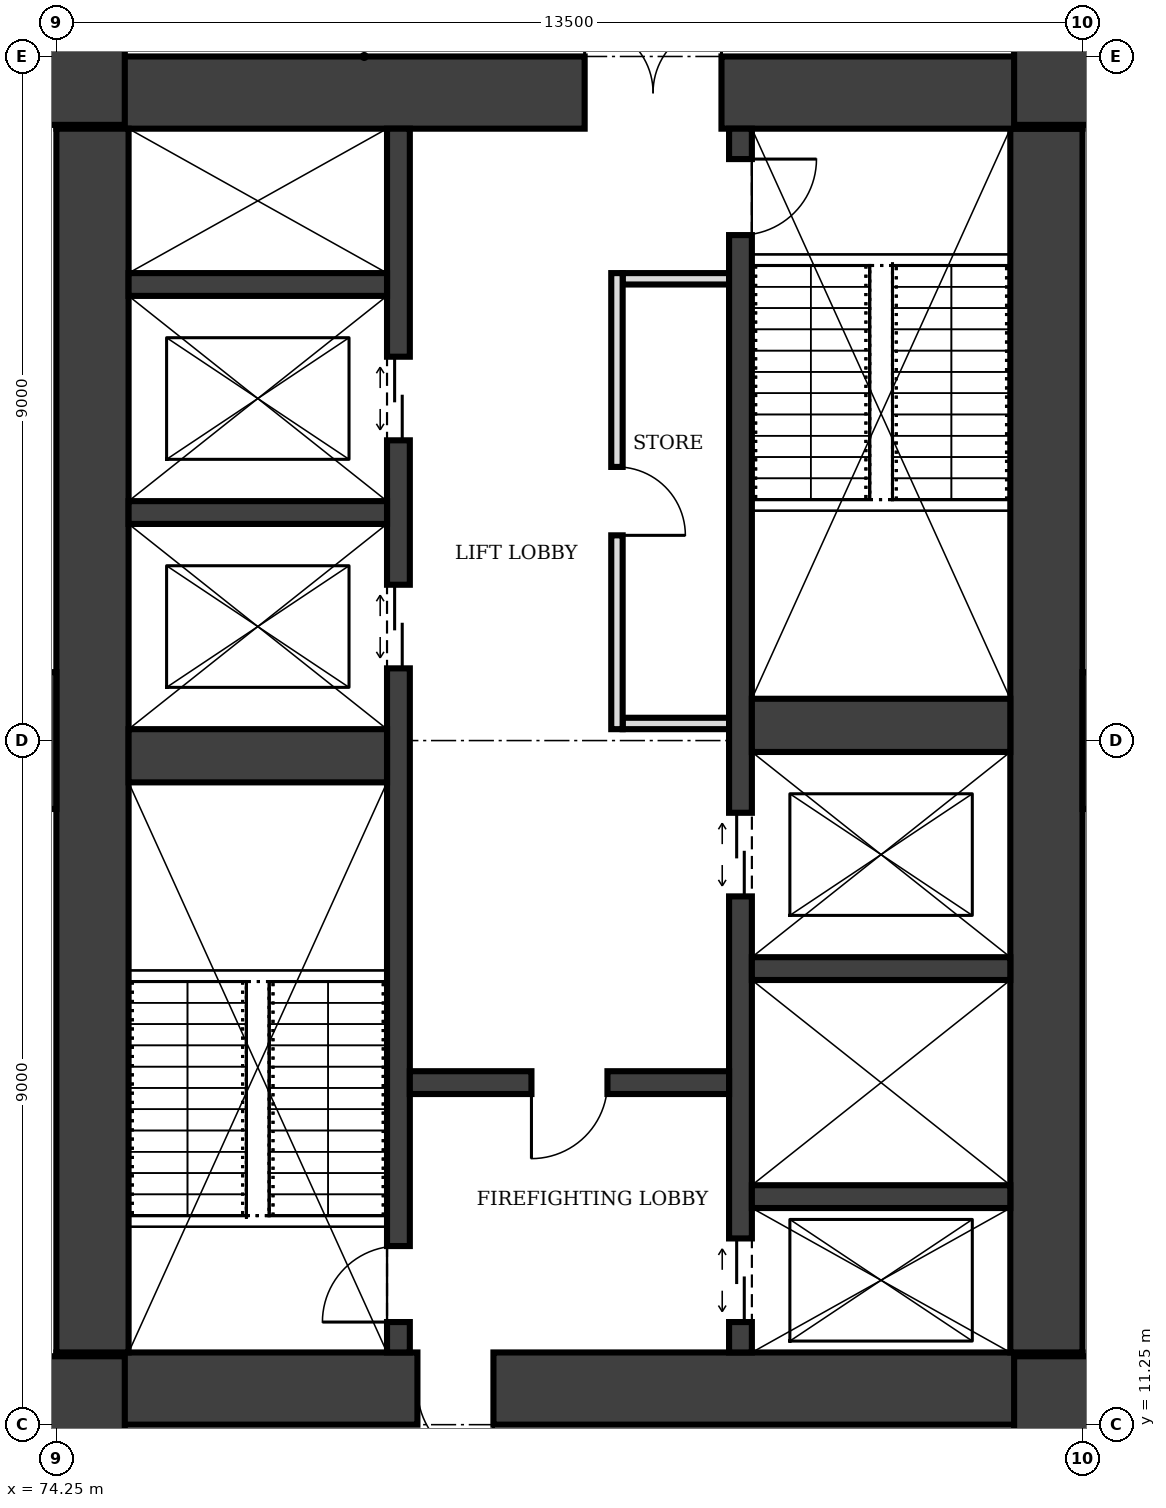
"""IFC4 building model, lengths in metres.
Left out: names, types, materials, properties, quantities, classifications, styles, units other than length and angle.
Written with IfcOpenShell. Run it as: python <this file> out.ifc"""

import sys

from ifc_helpers import new_model, si_unit, direction, frame, frame_2d, origin, place, context, subcontext, project, spatial, rectangle, extrude, element, fill, save


model = new_model("IFC4")
c1 = context("Model", 3, precision=1e-05, world=origin(), true_north=direction((0.0, 1.0)))
c2 = subcontext(c1, "Body", "Model", "MODEL_VIEW")
j1 = project(units=[si_unit("LENGTHUNIT", "METRE"), si_unit("PLANEANGLEUNIT", "RADIAN")], contexts=[c1])
p1 = place(None, origin())
s1 = spatial("IfcSite", under=j1, at=p1, CompositionType="ELEMENT")
p2 = place(p1, origin())
s2 = spatial("IfcBuilding", under=s1, at=p2, CompositionType="ELEMENT")
p3 = place(p2, frame((0.0, 0.0, 77.0)))
s3 = spatial("IfcBuildingStorey", under=s2, at=p3, CompositionType="ELEMENT", Elevation=77.0)
p4 = place(p3, frame((74.25, 11.725, 0.0), z_axis=(0.0, 0.0, 1.0), x_axis=(1.0, 0.0, 0.0)))
e1 = element("IfcWall", 1, at=p4, inside=s3, PredefinedType="SHEAR", context=c2, shape_type="SweptSolid", body=[
    extrude(rectangle(XDim=13.5, YDim=0.95, at=frame_2d((6.75, 0.0))), origin(), (0.0, 0.0, 1.0), 8.0),
])
p5 = place(p4, frame((4.75, 0.0, 0.0)))
e2 = element("IfcOpeningElement", 2, at=p5, cuts=e1, PredefinedType="OPENING", context=c2, shape_type="SweptSolid", body=[
    extrude(rectangle(XDim=1.0, YDim=2.1, at=frame_2d((0.5, 1.05))), frame((0.0, 0.485, 0.0), z_axis=(0.0, -1.0, 0.0), x_axis=(1.0, 0.0, 0.0)), (0.0, 0.0, 1.0), 0.97),
])
p6 = place(p3, frame((87.275, 12.2, 0.0), z_axis=(0.0, 0.0, 1.0), x_axis=(0.0, 1.0, 0.0)))
e3 = element("IfcWall", 3, at=p6, inside=s3, PredefinedType="SHEAR", context=c2, shape_type="SweptSolid", body=[
    extrude(rectangle(XDim=16.1, YDim=0.95, at=frame_2d((8.05, 0.0))), origin(), (0.0, 0.0, 1.0), 8.0),
])
p7 = place(p3, frame((87.75, 28.775, 0.0), z_axis=(0.0, 0.0, 1.0), x_axis=(-1.0, 0.0, 0.0)))
e4 = element("IfcWall", 4, at=p7, inside=s3, PredefinedType="SHEAR", context=c2, shape_type="SweptSolid", body=[
    extrude(rectangle(XDim=13.5, YDim=0.95, at=frame_2d((6.75, 0.0))), origin(), (0.0, 0.0, 1.0), 8.0),
])
p8 = place(p7, frame((4.75, 0.0, 0.0)))
e5 = element("IfcOpeningElement", 5, at=p8, cuts=e4, PredefinedType="OPENING", context=c2, shape_type="SweptSolid", body=[
    extrude(rectangle(XDim=1.8, YDim=2.1, at=frame_2d((0.9, 1.05))), frame((0.0, 0.485, 0.0), z_axis=(0.0, -1.0, 0.0), x_axis=(1.0, 0.0, 0.0)), (0.0, 0.0, 1.0), 0.97),
])
p9 = place(p3, frame((74.725, 28.3, 0.0), z_axis=(0.0, 0.0, 1.0), x_axis=(0.0, -1.0, 0.0)))
e6 = element("IfcWall", 6, at=p9, inside=s3, PredefinedType="SHEAR", context=c2, shape_type="SweptSolid", body=[
    extrude(rectangle(XDim=16.1, YDim=0.95, at=frame_2d((8.05, 0.0))), origin(), (0.0, 0.0, 1.0), 8.0),
])
p10 = place(p3, frame((78.75, 12.2, 0.0), z_axis=(0.0, 0.0, 1.0), x_axis=(0.0, 1.0, 0.0)))
e7 = element("IfcWall", 7, at=p10, inside=s3, PredefinedType="SHEAR", context=c2, shape_type="SweptSolid", body=[
    extrude(rectangle(XDim=16.1, YDim=0.3, at=frame_2d((8.05, 0.0))), origin(), (0.0, 0.0, 1.0), 8.0),
])
p11 = place(p10, frame((0.4, 0.0, 0.0)))
e8 = element("IfcOpeningElement", 8, at=p11, cuts=e7, PredefinedType="OPENING", context=c2, shape_type="SweptSolid", body=[
    extrude(rectangle(XDim=1.0, YDim=2.1, at=frame_2d((0.5, 1.05))), frame((0.0, 0.16, 0.0), z_axis=(0.0, -1.0, 0.0), x_axis=(1.0, 0.0, 0.0)), (0.0, 0.0, 1.0), 0.32),
])
p12 = place(p10, frame((9.0, 0.0, 0.0)))
e9 = element("IfcOpeningElement", 9, at=p12, cuts=e7, PredefinedType="OPENING", context=c2, shape_type="SweptSolid", body=[
    extrude(rectangle(XDim=1.1, YDim=2.1, at=frame_2d((0.55, 1.05))), frame((0.0, 0.16, 0.0), z_axis=(0.0, -1.0, 0.0), x_axis=(1.0, 0.0, 0.0)), (0.0, 0.0, 1.0), 0.32),
])
p13 = place(p10, frame((12.0, 0.0, 0.0)))
e10 = element("IfcOpeningElement", 10, at=p13, cuts=e7, PredefinedType="OPENING", context=c2, shape_type="SweptSolid", body=[
    extrude(rectangle(XDim=1.1, YDim=2.1, at=frame_2d((0.55, 1.05))), frame((0.0, 0.16, 0.0), z_axis=(0.0, -1.0, 0.0), x_axis=(1.0, 0.0, 0.0)), (0.0, 0.0, 1.0), 0.32),
])
p14 = place(p3, frame((83.25, 12.2, 0.0), z_axis=(0.0, 0.0, 1.0), x_axis=(0.0, 1.0, 0.0)))
e11 = element("IfcWall", 11, at=p14, inside=s3, PredefinedType="SHEAR", context=c2, shape_type="SweptSolid", body=[
    extrude(rectangle(XDim=16.1, YDim=0.3, at=frame_2d((8.05, 0.0))), origin(), (0.0, 0.0, 1.0), 8.0),
])
p15 = place(p14, frame((14.7, 0.0, 0.0)))
e12 = element("IfcOpeningElement", 12, at=p15, cuts=e11, PredefinedType="OPENING", context=c2, shape_type="SweptSolid", body=[
    extrude(rectangle(XDim=1.0, YDim=2.1, at=frame_2d((0.5, 1.05))), frame((0.0, 0.16, 0.0), z_axis=(0.0, -1.0, 0.0), x_axis=(1.0, 0.0, 0.0)), (0.0, 0.0, 1.0), 0.32),
])
p16 = place(p14, frame((0.4, 0.0, 0.0)))
e13 = element("IfcOpeningElement", 13, at=p16, cuts=e11, PredefinedType="OPENING", context=c2, shape_type="SweptSolid", body=[
    extrude(rectangle(XDim=1.1, YDim=2.1, at=frame_2d((0.55, 1.05))), frame((0.0, 0.16, 0.0), z_axis=(0.0, -1.0, 0.0), x_axis=(1.0, 0.0, 0.0)), (0.0, 0.0, 1.0), 0.32),
])
p17 = place(p14, frame((6.0, 0.0, 0.0)))
e14 = element("IfcOpeningElement", 14, at=p17, cuts=e11, PredefinedType="OPENING", context=c2, shape_type="SweptSolid", body=[
    extrude(rectangle(XDim=1.1, YDim=2.1, at=frame_2d((0.55, 1.05))), frame((0.0, 0.16, 0.0), z_axis=(0.0, -1.0, 0.0), x_axis=(1.0, 0.0, 0.0)), (0.0, 0.0, 1.0), 0.32),
])
p18 = place(p3, frame((75.2, 20.05, 0.0), z_axis=(0.0, 0.0, 1.0), x_axis=(1.0, 0.0, 0.0)))
e15 = element("IfcWall", 15, at=p18, inside=s3, PredefinedType="SHEAR", context=c2, shape_type="SweptSolid", body=[
    extrude(rectangle(XDim=3.4, YDim=0.7, at=frame_2d((1.7, 0.0))), origin(), (0.0, 0.0, 1.0), 8.0),
])
p19 = place(p3, frame((78.9, 15.75, 0.0), z_axis=(0.0, 0.0, 1.0), x_axis=(1.0, 0.0, 0.0)))
e16 = element("IfcWall", 16, at=p19, inside=s3, PredefinedType="SHEAR", context=c2, shape_type="SweptSolid", body=[
    extrude(rectangle(XDim=4.2, YDim=0.3, at=frame_2d((2.1, 0.0))), origin(), (0.0, 0.0, 1.0), 8.0),
])
p20 = place(p19, frame((1.6, 0.0, 0.0)))
e17 = element("IfcOpeningElement", 17, at=p20, cuts=e16, PredefinedType="OPENING", context=c2, shape_type="SweptSolid", body=[
    extrude(rectangle(XDim=1.0, YDim=2.1, at=frame_2d((0.5, 1.05))), frame((0.0, 0.16, 0.0), z_axis=(0.0, -1.0, 0.0), x_axis=(1.0, 0.0, 0.0)), (0.0, 0.0, 1.0), 0.32),
])
for number, where, z_axis, x_axis in (
    (18, (83.4, 14.25, 0.0), (0.0, 0.0, 1.0), (1.0, 0.0, 0.0)),
    (19, (83.4, 17.25, 0.0), (0.0, 0.0, 1.0), (1.0, 0.0, 0.0)),
):
    element("IfcWall", number, at=place(p3, frame(where, z_axis=z_axis, x_axis=x_axis)), inside=s3, PredefinedType="SHEAR", context=c2, shape_type="SweptSolid", body=[
        extrude(rectangle(XDim=3.4, YDim=0.3, at=frame_2d((1.7, 0.0))), origin(), (0.0, 0.0, 1.0), 8.0),
    ])
p21 = place(p3, frame((83.4, 20.45, 0.0), z_axis=(0.0, 0.0, 1.0), x_axis=(1.0, 0.0, 0.0)))
e20 = element("IfcWall", 20, at=p21, inside=s3, PredefinedType="SHEAR", context=c2, shape_type="SweptSolid", body=[
    extrude(rectangle(XDim=3.4, YDim=0.7, at=frame_2d((1.7, 0.0))), origin(), (0.0, 0.0, 1.0), 8.0),
])
for number, where, z_axis, x_axis in (
    (21, (75.2, 23.25, 0.0), (0.0, 0.0, 1.0), (1.0, 0.0, 0.0)),
    (22, (75.2, 26.25, 0.0), (0.0, 0.0, 1.0), (1.0, 0.0, 0.0)),
):
    element("IfcWall", number, at=place(p3, frame(where, z_axis=z_axis, x_axis=x_axis)), inside=s3, PredefinedType="SHEAR", context=c2, shape_type="SweptSolid", body=[
        extrude(rectangle(XDim=3.4, YDim=0.3, at=frame_2d((1.7, 0.0))), origin(), (0.0, 0.0, 1.0), 8.0),
    ])
p22 = place(p3, frame((74.25, 4.5, 0.0), z_axis=(0.0, 0.0, 1.0), x_axis=(0.0, 1.0, 0.0)))
e23 = element("IfcWall", 23, at=p22, inside=s3, PredefinedType="SHEAR", context=c2, shape_type="SweptSolid", body=[
    extrude(rectangle(XDim=7.65, YDim=1.8, at=frame_2d((3.825, 0.0))), origin(), (0.0, 0.0, 1.0), 8.0),
])
p23 = place(p22, frame((2.775, 0.0, 0.0)))
e24 = element("IfcOpeningElement", 24, at=p23, cuts=e23, PredefinedType="OPENING", context=c2, shape_type="SweptSolid", body=[
    extrude(rectangle(XDim=1.2, YDim=2.1, at=frame_2d((0.6, 1.05))), frame((0.0, 0.91, 0.0), z_axis=(0.0, -1.0, 0.0), x_axis=(1.0, 0.0, 0.0)), (0.0, 0.0, 1.0), 1.82),
])
p24 = place(p3, frame((87.75, 4.5, 0.0), z_axis=(0.0, 0.0, 1.0), x_axis=(0.0, 1.0, 0.0)))
e25 = element("IfcWall", 25, at=p24, inside=s3, PredefinedType="SHEAR", context=c2, shape_type="SweptSolid", body=[
    extrude(rectangle(XDim=7.65, YDim=1.8, at=frame_2d((3.825, 0.0))), origin(), (0.0, 0.0, 1.0), 8.0),
])
p25 = place(p24, frame((2.775, 0.0, 0.0)))
e26 = element("IfcOpeningElement", 26, at=p25, cuts=e25, PredefinedType="OPENING", context=c2, shape_type="SweptSolid", body=[
    extrude(rectangle(XDim=1.2, YDim=2.1, at=frame_2d((0.6, 1.05))), frame((0.0, 0.91, 0.0), z_axis=(0.0, -1.0, 0.0), x_axis=(1.0, 0.0, 0.0)), (0.0, 0.0, 1.0), 1.82),
])
p26 = place(p3, frame((74.25, 28.35, 0.0), z_axis=(0.0, 0.0, 1.0), x_axis=(0.0, 1.0, 0.0)))
e27 = element("IfcWall", 27, at=p26, inside=s3, PredefinedType="SHEAR", context=c2, shape_type="SweptSolid", body=[
    extrude(rectangle(XDim=7.65, YDim=1.8, at=frame_2d((3.825, 0.0))), origin(), (0.0, 0.0, 1.0), 8.0),
])
p27 = place(p26, frame((3.675, 0.0, 0.0)))
e28 = element("IfcOpeningElement", 28, at=p27, cuts=e27, PredefinedType="OPENING", context=c2, shape_type="SweptSolid", body=[
    extrude(rectangle(XDim=1.2, YDim=2.1, at=frame_2d((0.6, 1.05))), frame((0.0, 0.91, 0.0), z_axis=(0.0, -1.0, 0.0), x_axis=(1.0, 0.0, 0.0)), (0.0, 0.0, 1.0), 1.82),
])
p28 = place(p3, frame((87.75, 28.35, 0.0), z_axis=(0.0, 0.0, 1.0), x_axis=(0.0, 1.0, 0.0)))
e29 = element("IfcWall", 29, at=p28, inside=s3, PredefinedType="SHEAR", context=c2, shape_type="SweptSolid", body=[
    extrude(rectangle(XDim=7.65, YDim=1.8, at=frame_2d((3.825, 0.0))), origin(), (0.0, 0.0, 1.0), 8.0),
])
p29 = place(p28, frame((3.675, 0.0, 0.0)))
e30 = element("IfcOpeningElement", 30, at=p29, cuts=e29, PredefinedType="OPENING", context=c2, shape_type="SweptSolid", body=[
    extrude(rectangle(XDim=1.2, YDim=2.1, at=frame_2d((0.6, 1.05))), frame((0.0, 0.91, 0.0), z_axis=(0.0, -1.0, 0.0), x_axis=(1.0, 0.0, 0.0)), (0.0, 0.0, 1.0), 1.82),
])
p30 = place(p3, frame((67.5, 20.25, 0.0), z_axis=(0.0, 0.0, 1.0), x_axis=(1.0, 0.0, 0.0)))
e31 = element("IfcWall", 31, at=p30, inside=s3, PredefinedType="SHEAR", context=c2, shape_type="SweptSolid", body=[
    extrude(rectangle(XDim=6.75, YDim=1.8, at=frame_2d((3.375, 0.0))), origin(), (0.0, 0.0, 1.0), 8.0),
])
p31 = place(p30, frame((2.775, 0.0, 0.0)))
e32 = element("IfcOpeningElement", 32, at=p31, cuts=e31, PredefinedType="OPENING", context=c2, shape_type="SweptSolid", body=[
    extrude(rectangle(XDim=1.2, YDim=2.1, at=frame_2d((0.6, 1.05))), frame((0.0, 0.91, 0.0), z_axis=(0.0, -1.0, 0.0), x_axis=(1.0, 0.0, 0.0)), (0.0, 0.0, 1.0), 1.82),
])
p32 = place(p3, frame((87.75, 20.25, 0.0), z_axis=(0.0, 0.0, 1.0), x_axis=(1.0, 0.0, 0.0)))
e33 = element("IfcWall", 33, at=p32, inside=s3, PredefinedType="SHEAR", context=c2, shape_type="SweptSolid", body=[
    extrude(rectangle(XDim=6.75, YDim=1.8, at=frame_2d((3.375, 0.0))), origin(), (0.0, 0.0, 1.0), 8.0),
])
p33 = place(p32, frame((2.775, 0.0, 0.0)))
e34 = element("IfcOpeningElement", 34, at=p33, cuts=e33, PredefinedType="OPENING", context=c2, shape_type="SweptSolid", body=[
    extrude(rectangle(XDim=1.2, YDim=2.1, at=frame_2d((0.6, 1.05))), frame((0.0, 0.91, 0.0), z_axis=(0.0, -1.0, 0.0), x_axis=(1.0, 0.0, 0.0)), (0.0, 0.0, 1.0), 1.82),
])
p34 = place(p3, frame((81.625, 20.4, 0.0), z_axis=(0.0, 0.0, 1.0), x_axis=(0.0, 1.0, 0.0)))
e35 = element("IfcWall", 35, at=p34, inside=s3, PredefinedType="PARTITIONING", context=c2, shape_type="SweptSolid", body=[
    extrude(rectangle(XDim=6.0, YDim=0.15, at=frame_2d((3.0, 0.0))), origin(), (0.0, 0.0, 1.0), 7.75),
])
p35 = place(p34, frame((2.55, 0.0, 0.0)))
e36 = element("IfcOpeningElement", 36, at=p35, cuts=e35, PredefinedType="OPENING", context=c2, shape_type="SweptSolid", body=[
    extrude(rectangle(XDim=0.9, YDim=2.1, at=frame_2d((0.45, 1.05))), frame((0.0, 0.085, 0.0), z_axis=(0.0, -1.0, 0.0), x_axis=(1.0, 0.0, 0.0)), (0.0, 0.0, 1.0), 0.17),
])
for number, where, z_axis, x_axis in (
    (37, (81.7, 20.475, 0.0), (0.0, 0.0, 1.0), (1.0, 0.0, 0.0)),
    (38, (81.7, 26.325, 0.0), (0.0, 0.0, 1.0), (1.0, 0.0, 0.0)),
):
    element("IfcWall", number, at=place(p3, frame(where, z_axis=z_axis, x_axis=x_axis)), inside=s3, PredefinedType="PARTITIONING", context=c2, shape_type="SweptSolid", body=[
        extrude(rectangle(XDim=1.4, YDim=0.15, at=frame_2d((0.7, 0.0))), origin(), (0.0, 0.0, 1.0), 7.75),
    ])
p36 = place(p5, frame((1.0, 0.0, 0.0), z_axis=(0.0, 0.0, 1.0), x_axis=(-1.0, 0.0, 0.0)))
e39 = element("IfcDoor", 39, at=p36, inside=s3, OperationType="SINGLE_SWING_LEFT", PredefinedType="DOOR", context=c2, shape_type="SweptSolid", body=[
    extrude(rectangle(XDim=1.0, YDim=2.1, at=frame_2d((0.5, 1.05))), frame((0.0, 0.025, 0.0), z_axis=(0.0, -1.0, 0.0), x_axis=(1.0, 0.0, 0.0)), (0.0, 0.0, 1.0), 0.05),
])
fill(e2, e39)
p37 = place(p8, frame((1.8, 0.0, 0.0), z_axis=(0.0, 0.0, 1.0), x_axis=(-1.0, 0.0, 0.0)))
e40 = element("IfcDoor", 40, at=p37, inside=s3, OperationType="DOUBLE_DOOR_SINGLE_SWING", PredefinedType="DOOR", context=c2, shape_type="SweptSolid", body=[
    extrude(rectangle(XDim=1.8, YDim=2.1, at=frame_2d((0.9, 1.05))), frame((0.0, 0.025, 0.0), z_axis=(0.0, -1.0, 0.0), x_axis=(1.0, 0.0, 0.0)), (0.0, 0.0, 1.0), 0.05),
])
fill(e5, e40)
p38 = place(p20, frame((1.0, 0.0, 0.0), z_axis=(0.0, 0.0, 1.0), x_axis=(-1.0, 0.0, 0.0)))
e41 = element("IfcDoor", 41, at=p38, inside=s3, OperationType="SINGLE_SWING_RIGHT", PredefinedType="DOOR", context=c2, shape_type="SweptSolid", body=[
    extrude(rectangle(XDim=1.0, YDim=2.1, at=frame_2d((0.5, 1.05))), frame((0.0, 0.025, 0.0), z_axis=(0.0, -1.0, 0.0), x_axis=(1.0, 0.0, 0.0)), (0.0, 0.0, 1.0), 0.05),
])
fill(e17, e41)
p39 = place(p11, origin())
e42 = element("IfcDoor", 42, at=p39, inside=s3, OperationType="SINGLE_SWING_LEFT", PredefinedType="DOOR", context=c2, shape_type="SweptSolid", body=[
    extrude(rectangle(XDim=1.0, YDim=2.1, at=frame_2d((0.5, 1.05))), frame((0.0, 0.025, 0.0), z_axis=(0.0, -1.0, 0.0), x_axis=(1.0, 0.0, 0.0)), (0.0, 0.0, 1.0), 0.05),
])
fill(e8, e42)
p40 = place(p15, frame((1.0, 0.0, 0.0), z_axis=(0.0, 0.0, 1.0), x_axis=(-1.0, 0.0, 0.0)))
e43 = element("IfcDoor", 43, at=p40, inside=s3, OperationType="SINGLE_SWING_LEFT", PredefinedType="DOOR", context=c2, shape_type="SweptSolid", body=[
    extrude(rectangle(XDim=1.0, YDim=2.1, at=frame_2d((0.5, 1.05))), frame((0.0, 0.025, 0.0), z_axis=(0.0, -1.0, 0.0), x_axis=(1.0, 0.0, 0.0)), (0.0, 0.0, 1.0), 0.05),
])
fill(e12, e43)
p41 = place(p16, origin())
e44 = element("IfcDoor", 44, at=p41, inside=s3, OperationType="DOUBLE_DOOR_SLIDING", PredefinedType="DOOR", context=c2, shape_type="SweptSolid", body=[
    extrude(rectangle(XDim=1.1, YDim=2.1, at=frame_2d((0.55, 1.05))), frame((0.0, 0.025, 0.0), z_axis=(0.0, -1.0, 0.0), x_axis=(1.0, 0.0, 0.0)), (0.0, 0.0, 1.0), 0.05),
])
fill(e13, e44)
p42 = place(p12, origin())
e45 = element("IfcDoor", 45, at=p42, inside=s3, OperationType="DOUBLE_DOOR_SLIDING", PredefinedType="DOOR", context=c2, shape_type="SweptSolid", body=[
    extrude(rectangle(XDim=1.1, YDim=2.1, at=frame_2d((0.55, 1.05))), frame((0.0, 0.025, 0.0), z_axis=(0.0, -1.0, 0.0), x_axis=(1.0, 0.0, 0.0)), (0.0, 0.0, 1.0), 0.05),
])
fill(e9, e45)
p43 = place(p13, origin())
e46 = element("IfcDoor", 46, at=p43, inside=s3, OperationType="DOUBLE_DOOR_SLIDING", PredefinedType="DOOR", context=c2, shape_type="SweptSolid", body=[
    extrude(rectangle(XDim=1.1, YDim=2.1, at=frame_2d((0.55, 1.05))), frame((0.0, 0.025, 0.0), z_axis=(0.0, -1.0, 0.0), x_axis=(1.0, 0.0, 0.0)), (0.0, 0.0, 1.0), 0.05),
])
fill(e10, e46)
p44 = place(p17, origin())
e47 = element("IfcDoor", 47, at=p44, inside=s3, OperationType="DOUBLE_DOOR_SLIDING", PredefinedType="DOOR", context=c2, shape_type="SweptSolid", body=[
    extrude(rectangle(XDim=1.1, YDim=2.1, at=frame_2d((0.55, 1.05))), frame((0.0, 0.025, 0.0), z_axis=(0.0, -1.0, 0.0), x_axis=(1.0, 0.0, 0.0)), (0.0, 0.0, 1.0), 0.05),
])
fill(e14, e47)
p45 = place(p35, frame((0.9, 0.0, 0.0), z_axis=(0.0, 0.0, 1.0), x_axis=(-1.0, 0.0, 0.0)))
e48 = element("IfcDoor", 48, at=p45, inside=s3, OperationType="SINGLE_SWING_RIGHT", PredefinedType="DOOR", context=c2, shape_type="SweptSolid", body=[
    extrude(rectangle(XDim=0.9, YDim=2.1, at=frame_2d((0.45, 1.05))), frame((0.0, 0.025, 0.0), z_axis=(0.0, -1.0, 0.0), x_axis=(1.0, 0.0, 0.0)), (0.0, 0.0, 1.0), 0.05),
])
fill(e36, e48)
save(model, sys.argv[1])
